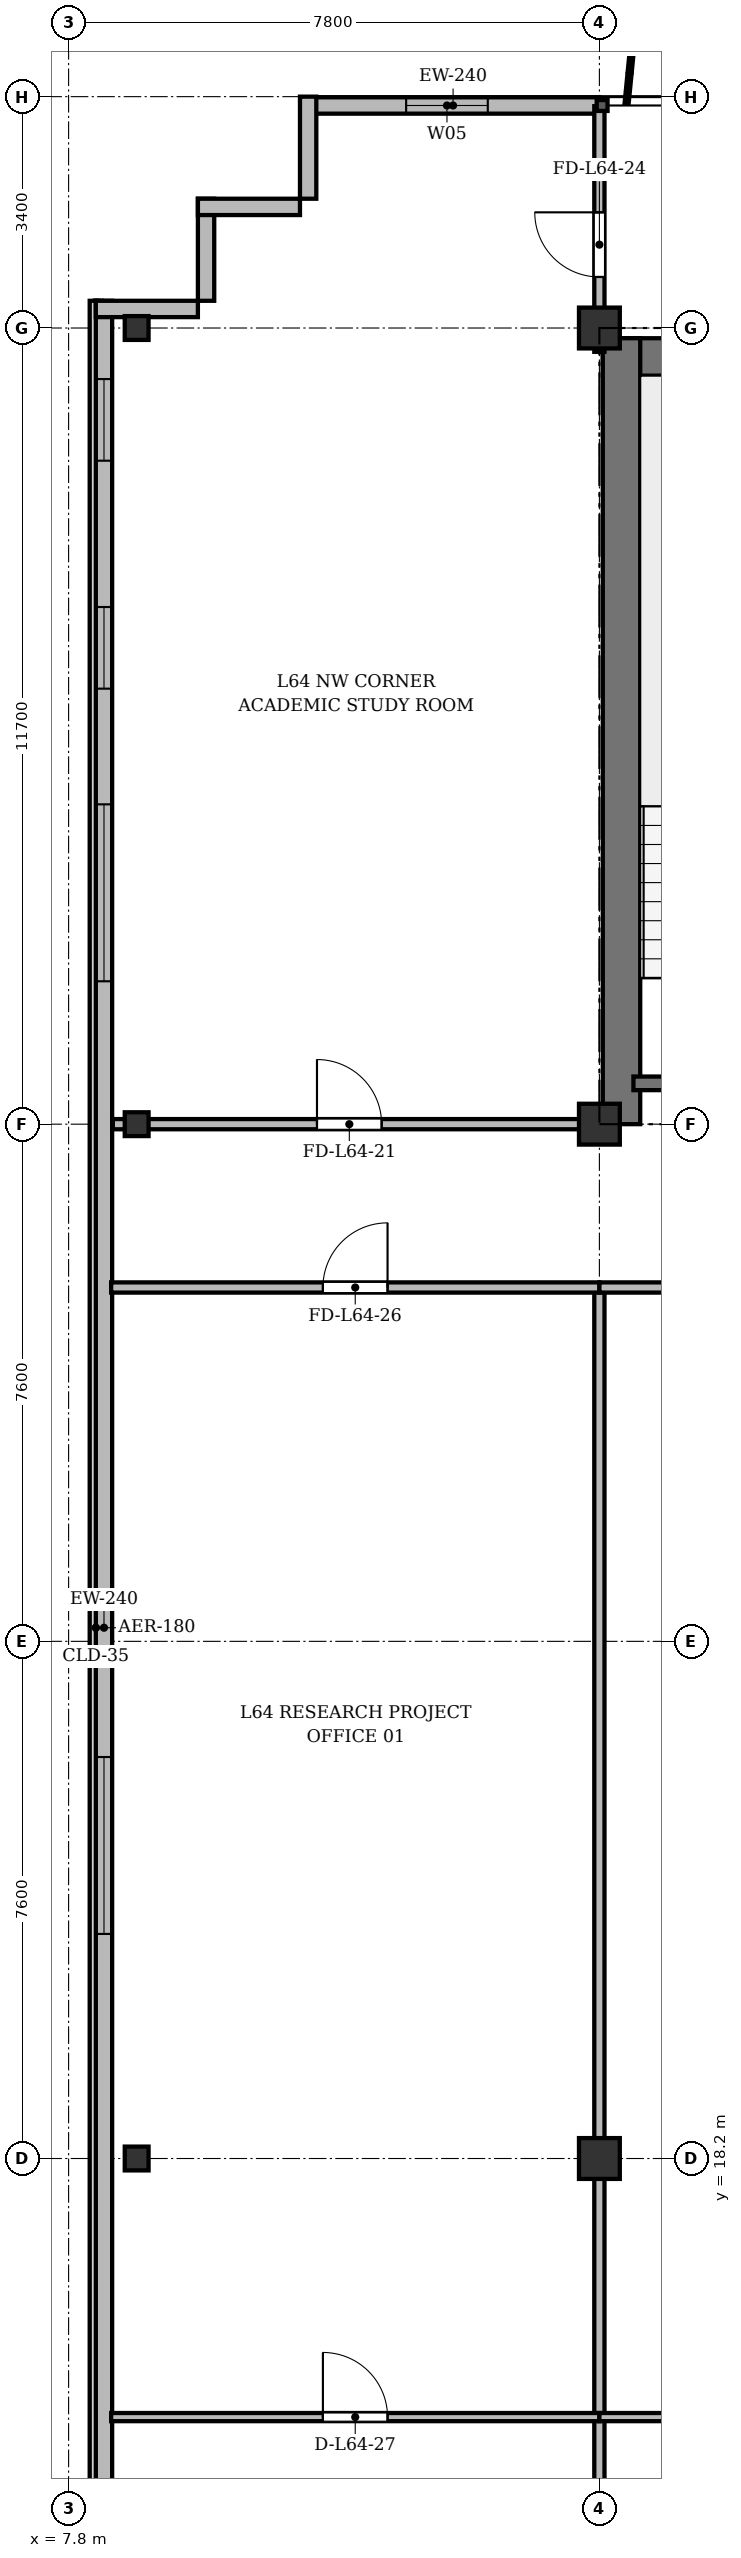
"""IFC4 building model, lengths in metres.
Left out: names, types, materials, properties, quantities, classifications, styles, units other than length and angle.
Written with IfcOpenShell. Run it as: python <this file> out.ifc"""

import sys

from ifc_helpers import new_model, si_unit, direction, frame, frame_2d, origin, origin_2d, place, context, subcontext, project, spatial, rectangle, i_section, extrude, source, transform, mapped, element, fill, save


model = new_model("IFC4")
c1 = context("Model", 3, precision=1e-05, world=origin(), true_north=direction((0.0, 1.0)))
c2 = subcontext(c1, "Body", "Model", "MODEL_VIEW")
j1 = project(units=[si_unit("LENGTHUNIT", "METRE"), si_unit("PLANEANGLEUNIT", "RADIAN")], contexts=[c1])
p1 = place(None, origin())
s1 = spatial("IfcSite", under=j1, at=p1, CompositionType="ELEMENT")
p2 = place(p1, origin())
s2 = spatial("IfcBuilding", under=s1, at=p2, CompositionType="ELEMENT")
p3 = place(p2, frame((0.0, 0.0, 248.7)))
s3 = spatial("IfcBuildingStorey", under=s2, at=p3, CompositionType="ELEMENT", Elevation=248.7)
m1 = source(origin(), c2, "Body", "SweptSolid", [
    extrude(i_section(OverallWidth=0.35, OverallDepth=0.35, WebThickness=0.018, FlangeThickness=0.028, at=origin_2d()), origin(), (0.0, 0.0, 1.0), 3.6),
])
for number, where, z_axis, x_axis in (
    (1, (8.8, 18.2, 0.0), (0.0, 0.0, 1.0), (1.0, 0.0, 0.0)),
    (2, (8.8, 33.4, 0.0), (0.0, 0.0, 1.0), (1.0, 0.0, 0.0)),
    (3, (8.8, 45.1, 0.0), (0.0, 0.0, 1.0), (1.0, 0.0, 0.0)),
):
    element("IfcColumn", number, at=place(p3, frame(where, z_axis=z_axis, x_axis=x_axis)), inside=s3, PredefinedType="COLUMN", context=c2, shape_type="MappedRepresentation", body=[
        mapped(m1, transform((0.0, 0.0, 0.0), x_axis=(1.0, 0.0, 0.0), y_axis=(0.0, 1.0, 0.0), z_axis=(0.0, 0.0, 1.0), scale=1.0)),
    ])
m2 = source(origin(), c2, "Body", "SweptSolid", [
    extrude(rectangle(XDim=0.6, YDim=0.6, at=origin_2d()), origin(), (0.0, 0.0, 1.0), 3.6),
])
for number, where, z_axis, x_axis in (
    (4, (15.6, 18.2, 0.0), (0.0, 0.0, 1.0), (1.0, 0.0, 0.0)),
    (5, (15.6, 33.4, 0.0), (0.0, 0.0, 1.0), (1.0, 0.0, 0.0)),
    (6, (15.6, 45.1, 0.0), (0.0, 0.0, 1.0), (1.0, 0.0, 0.0)),
):
    element("IfcColumn", number, at=place(p3, frame(where, z_axis=z_axis, x_axis=x_axis)), inside=s3, PredefinedType="COLUMN", context=c2, shape_type="MappedRepresentation", body=[
        mapped(m2, transform((0.0, 0.0, 0.0), x_axis=(1.0, 0.0, 0.0), y_axis=(0.0, 1.0, 0.0), z_axis=(0.0, 0.0, 1.0), scale=1.0)),
    ])
p4 = place(p3, frame((11.3, 48.37, 0.0), z_axis=(0.0, 0.0, 1.0), x_axis=(1.0, 0.0, 0.0)))
e7 = element("IfcWall", 7, at=p4, inside=s3, PredefinedType="SOLIDWALL", context=c2, shape_type="SweptSolid", body=[
    extrude(rectangle(XDim=4.3, YDim=0.24, at=frame_2d((2.15, 0.0))), origin(), (0.0, 0.0, 1.0), 3.37),
])
p5 = place(p4, frame((1.46, 0.0, 0.9)))
e8 = element("IfcOpeningElement", 8, at=p5, cuts=e7, PredefinedType="OPENING", context=c2, shape_type="SweptSolid", body=[
    extrude(rectangle(XDim=1.2, YDim=1.65, at=frame_2d((0.6, 0.825))), frame((0.0, 0.13, 0.0), z_axis=(0.0, -1.0, 0.0), x_axis=(1.0, 0.0, 0.0)), (0.0, 0.0, 1.0), 0.26),
])
p6 = place(p3, frame((8.32, 6.5, 0.0), z_axis=(0.0, 0.0, 1.0), x_axis=(0.0, 1.0, 0.0)))
e9 = element("IfcWall", 9, at=p6, inside=s3, PredefinedType="SOLIDWALL", context=c2, shape_type="SweptSolid", body=[
    extrude(rectangle(XDim=39.0, YDim=0.24, at=frame_2d((19.5, 0.0))), origin(), (0.0, 0.0, 1.0), 3.37),
])
p7 = place(p6, frame((1.45, 0.0, 0.92)))
e10 = element("IfcOpeningElement", 10, at=p7, cuts=e9, PredefinedType="OPENING", context=c2, shape_type="SweptSolid", body=[
    extrude(rectangle(XDim=1.2, YDim=1.65, at=frame_2d((0.6, 0.825))), frame((0.0, 0.13, 0.0), z_axis=(0.0, -1.0, 0.0), x_axis=(1.0, 0.0, 0.0)), (0.0, 0.0, 1.0), 0.26),
])
p8 = place(p6, frame((3.6, 0.0, 0.92)))
e11 = element("IfcOpeningElement", 11, at=p8, cuts=e9, PredefinedType="OPENING", context=c2, shape_type="SweptSolid", body=[
    extrude(rectangle(XDim=2.6, YDim=1.9, at=frame_2d((1.3, 0.95))), frame((0.0, 0.13, 0.0), z_axis=(0.0, -1.0, 0.0), x_axis=(1.0, 0.0, 0.0)), (0.0, 0.0, 1.0), 0.26),
])
p9 = place(p6, frame((15.0, 0.0, 0.92)))
e12 = element("IfcOpeningElement", 12, at=p9, cuts=e9, PredefinedType="OPENING", context=c2, shape_type="SweptSolid", body=[
    extrude(rectangle(XDim=2.6, YDim=1.9, at=frame_2d((1.3, 0.95))), frame((0.0, 0.13, 0.0), z_axis=(0.0, -1.0, 0.0), x_axis=(1.0, 0.0, 0.0)), (0.0, 0.0, 1.0), 0.26),
])
p10 = place(p6, frame((29.0, 0.0, 0.92)))
e13 = element("IfcOpeningElement", 13, at=p10, cuts=e9, PredefinedType="OPENING", context=c2, shape_type="SweptSolid", body=[
    extrude(rectangle(XDim=2.6, YDim=1.9, at=frame_2d((1.3, 0.95))), frame((0.0, 0.13, 0.0), z_axis=(0.0, -1.0, 0.0), x_axis=(1.0, 0.0, 0.0)), (0.0, 0.0, 1.0), 0.26),
])
p11 = place(p6, frame((33.3, 0.0, 0.92)))
e14 = element("IfcOpeningElement", 14, at=p11, cuts=e9, PredefinedType="OPENING", context=c2, shape_type="SweptSolid", body=[
    extrude(rectangle(XDim=1.2, YDim=1.65, at=frame_2d((0.6, 0.825))), frame((0.0, 0.13, 0.0), z_axis=(0.0, -1.0, 0.0), x_axis=(1.0, 0.0, 0.0)), (0.0, 0.0, 1.0), 0.26),
])
p12 = place(p6, frame((36.65, 0.0, 0.92)))
e15 = element("IfcOpeningElement", 15, at=p12, cuts=e9, PredefinedType="OPENING", context=c2, shape_type="SweptSolid", body=[
    extrude(rectangle(XDim=1.2, YDim=1.65, at=frame_2d((0.6, 0.825))), frame((0.0, 0.13, 0.0), z_axis=(0.0, -1.0, 0.0), x_axis=(1.0, 0.0, 0.0)), (0.0, 0.0, 1.0), 0.26),
])
for number, where, z_axis, x_axis in (
    (16, (8.2, 45.38, 0.0), (0.0, 0.0, 1.0), (1.0, 0.0, 0.0)),
    (17, (9.82, 45.5, 0.0), (0.0, 0.0, 1.0), (0.0, 1.0, 0.0)),
    (18, (9.7, 46.88, 0.0), (0.0, 0.0, 1.0), (1.0, 0.0, 0.0)),
    (19, (11.32, 47.0, 0.0), (0.0, 0.0, 1.0), (0.0, 1.0, 0.0)),
):
    element("IfcWall", number, at=place(p3, frame(where, z_axis=z_axis, x_axis=x_axis)), inside=s3, PredefinedType="SOLIDWALL", context=c2, shape_type="SweptSolid", body=[
        extrude(rectangle(XDim=1.5, YDim=0.24, at=frame_2d((0.75, 0.0))), origin(), (0.0, 0.0, 1.0), 3.37),
    ])
p13 = place(p3, frame((15.65, 44.675, 0.0), z_axis=(0.0, 0.0, 1.0), x_axis=(1.0, 0.0, 0.0)))
e20 = element("IfcWall", 20, at=p13, inside=s3, PredefinedType="SHEAR", context=c2, shape_type="SweptSolid", body=[
    extrude(rectangle(XDim=43.1, YDim=0.55, at=frame_2d((21.55, 0.0))), origin(), (0.0, 0.0, 1.0), 3.37),
])
p14 = place(p3, frame((15.925, 33.4, 0.0), z_axis=(0.0, 0.0, 1.0), x_axis=(0.0, 1.0, 0.0)))
e21 = element("IfcWall", 21, at=p14, inside=s3, PredefinedType="SHEAR", context=c2, shape_type="SweptSolid", body=[
    extrude(rectangle(XDim=11.55, YDim=0.55, at=frame_2d((5.775, 0.0))), origin(), (0.0, 0.0, 1.0), 3.37),
])
p15 = place(p3, frame((16.1, 34.0, 0.0), z_axis=(0.0, 0.0, 1.0), x_axis=(1.0, 0.0, 0.0)))
e22 = element("IfcWall", 22, at=p15, inside=s3, PredefinedType="SHEAR", context=c2, shape_type="SweptSolid", body=[
    extrude(rectangle(XDim=3.4, YDim=0.2, at=frame_2d((1.7, 0.0))), origin(), (0.0, 0.0, 1.0), 3.37),
])
p16 = place(p3, frame((8.45, 33.4, 0.0), z_axis=(0.0, 0.0, 1.0), x_axis=(1.0, 0.0, 0.0)))
e23 = element("IfcWall", 23, at=p16, inside=s3, PredefinedType="PARTITIONING", context=c2, shape_type="SweptSolid", body=[
    extrude(rectangle(XDim=7.15, YDim=0.15, at=frame_2d((3.575, 0.0))), origin(), (0.0, 0.0, 1.0), 2.92),
])
p17 = place(p16, frame((3.0, 0.0, 0.0)))
e24 = element("IfcOpeningElement", 24, at=p17, cuts=e23, PredefinedType="OPENING", context=c2, shape_type="SweptSolid", body=[
    extrude(rectangle(XDim=0.95, YDim=2.15, at=frame_2d((0.475, 1.075))), frame((0.0, 0.085, 0.0), z_axis=(0.0, -1.0, 0.0), x_axis=(1.0, 0.0, 0.0)), (0.0, 0.0, 1.0), 0.17),
])
p18 = place(p3, frame((15.6, 44.75, 0.0), z_axis=(0.0, 0.0, 1.0), x_axis=(0.0, 1.0, 0.0)))
e25 = element("IfcWall", 25, at=p18, inside=s3, PredefinedType="PARTITIONING", context=c2, shape_type="SweptSolid", body=[
    extrude(rectangle(XDim=3.61, YDim=0.15, at=frame_2d((1.805, 0.0))), origin(), (0.0, 0.0, 1.0), 2.87),
])
p19 = place(p18, frame((1.1, 0.0, 0.0)))
e26 = element("IfcOpeningElement", 26, at=p19, cuts=e25, PredefinedType="OPENING", context=c2, shape_type="SweptSolid", body=[
    extrude(rectangle(XDim=0.95, YDim=2.15, at=frame_2d((0.475, 1.075))), frame((0.0, 0.085, 0.0), z_axis=(0.0, -1.0, 0.0), x_axis=(1.0, 0.0, 0.0)), (0.0, 0.0, 1.0), 0.17),
])
p20 = place(p3, frame((15.6, 3.725, 0.0), z_axis=(0.0, 0.0, 1.0), x_axis=(0.0, 1.0, 0.0)))
e27 = element("IfcWall", 27, at=p20, inside=s3, PredefinedType="PARTITIONING", context=c2, shape_type="SweptSolid", body=[
    extrude(rectangle(XDim=27.275, YDim=0.15, at=frame_2d((13.637, 0.0))), origin(), (0.0, 0.0, 1.0), 2.87),
])
p21 = place(p3, frame((8.425, 31.0, 0.0), z_axis=(0.0, 0.0, 1.0), x_axis=(1.0, 0.0, 0.0)))
e28 = element("IfcWall", 28, at=p21, inside=s3, PredefinedType="PARTITIONING", context=c2, shape_type="SweptSolid", body=[
    extrude(rectangle(XDim=7.175, YDim=0.15, at=frame_2d((3.587, 0.0))), origin(), (0.0, 0.0, 1.0), 2.87),
])
p22 = place(p21, frame((3.112, 0.0, 0.0)))
e29 = element("IfcOpeningElement", 29, at=p22, cuts=e28, PredefinedType="OPENING", context=c2, shape_type="SweptSolid", body=[
    extrude(rectangle(XDim=0.95, YDim=2.15, at=frame_2d((0.475, 1.075))), frame((0.0, 0.085, 0.0), z_axis=(0.0, -1.0, 0.0), x_axis=(1.0, 0.0, 0.0)), (0.0, 0.0, 1.0), 0.17),
])
p23 = place(p3, frame((8.425, 14.4, 0.0), z_axis=(0.0, 0.0, 1.0), x_axis=(1.0, 0.0, 0.0)))
e30 = element("IfcWall", 30, at=p23, inside=s3, PredefinedType="PARTITIONING", context=c2, shape_type="SweptSolid", body=[
    extrude(rectangle(XDim=7.175, YDim=0.12, at=frame_2d((3.587, 0.0))), origin(), (0.0, 0.0, 1.0), 2.87),
])
p24 = place(p23, frame((3.112, 0.0, 0.0)))
e31 = element("IfcOpeningElement", 31, at=p24, cuts=e30, PredefinedType="OPENING", context=c2, shape_type="SweptSolid", body=[
    extrude(rectangle(XDim=0.95, YDim=2.15, at=frame_2d((0.475, 1.075))), frame((0.0, 0.07, 0.0), z_axis=(0.0, -1.0, 0.0), x_axis=(1.0, 0.0, 0.0)), (0.0, 0.0, 1.0), 0.14),
])
p25 = place(p3, frame((15.6, 31.0, 0.0), z_axis=(0.0, 0.0, 1.0), x_axis=(1.0, 0.0, 0.0)))
e32 = element("IfcWall", 32, at=p25, inside=s3, PredefinedType="PARTITIONING", context=c2, shape_type="SweptSolid", body=[
    extrude(rectangle(XDim=7.8, YDim=0.15, at=frame_2d((3.9, 0.0))), origin(), (0.0, 0.0, 1.0), 2.87),
])
p26 = place(p25, frame((3.333, 0.0, 0.0)))
e33 = element("IfcOpeningElement", 33, at=p26, cuts=e32, PredefinedType="OPENING", context=c2, shape_type="SweptSolid", body=[
    extrude(rectangle(XDim=0.95, YDim=2.15, at=frame_2d((0.475, 1.075))), frame((0.0, 0.085, 0.0), z_axis=(0.0, -1.0, 0.0), x_axis=(1.0, 0.0, 0.0)), (0.0, 0.0, 1.0), 0.17),
])
p27 = place(p3, frame((15.6, 14.4, 0.0), z_axis=(0.0, 0.0, 1.0), x_axis=(1.0, 0.0, 0.0)))
e34 = element("IfcWall", 34, at=p27, inside=s3, PredefinedType="PARTITIONING", context=c2, shape_type="SweptSolid", body=[
    extrude(rectangle(XDim=7.8, YDim=0.12, at=frame_2d((3.9, 0.0))), origin(), (0.0, 0.0, 1.0), 2.87),
])
p28 = place(p27, frame((3.333, 0.0, 0.0)))
e35 = element("IfcOpeningElement", 35, at=p28, cuts=e34, PredefinedType="OPENING", context=c2, shape_type="SweptSolid", body=[
    extrude(rectangle(XDim=0.95, YDim=2.15, at=frame_2d((0.475, 1.075))), frame((0.0, 0.07, 0.0), z_axis=(0.0, -1.0, 0.0), x_axis=(1.0, 0.0, 0.0)), (0.0, 0.0, 1.0), 0.14),
])
m3 = source(origin(), c2, "Body", "SweptSolid", [
    extrude(rectangle(XDim=1.2, YDim=1.65, at=frame_2d((0.6, 0.825))), frame((0.0, 0.03, 0.0), z_axis=(0.0, -1.0, 0.0), x_axis=(1.0, 0.0, 0.0)), (0.0, 0.0, 1.0), 0.06),
])
p29 = place(p5, origin())
e36 = element("IfcWindow", 36, at=p29, inside=s3, PartitioningType="SINGLE_PANEL", PredefinedType="WINDOW", context=c2, shape_type="MappedRepresentation", body=[
    mapped(m3, transform((0.0, 0.0, 0.0), x_axis=(1.0, 0.0, 0.0), y_axis=(0.0, 1.0, 0.0), z_axis=(0.0, 0.0, 1.0), scale=1.0)),
])
fill(e8, e36)
m4 = source(origin(), c2, "Body", "SweptSolid", [
    extrude(rectangle(XDim=2.6, YDim=1.9, at=frame_2d((1.3, 0.95))), frame((0.0, 0.03, 0.0), z_axis=(0.0, -1.0, 0.0), x_axis=(1.0, 0.0, 0.0)), (0.0, 0.0, 1.0), 0.06),
])
p30 = place(p9, origin())
e37 = element("IfcWindow", 37, at=p30, inside=s3, PartitioningType="SINGLE_PANEL", PredefinedType="WINDOW", context=c2, shape_type="MappedRepresentation", body=[
    mapped(m4, transform((0.0, 0.0, 0.0), x_axis=(1.0, 0.0, 0.0), y_axis=(0.0, 1.0, 0.0), z_axis=(0.0, 0.0, 1.0), scale=1.0)),
])
fill(e12, e37)
p31 = place(p10, origin())
e38 = element("IfcWindow", 38, at=p31, inside=s3, PartitioningType="SINGLE_PANEL", PredefinedType="WINDOW", context=c2, shape_type="MappedRepresentation", body=[
    mapped(m4, transform((0.0, 0.0, 0.0), x_axis=(1.0, 0.0, 0.0), y_axis=(0.0, 1.0, 0.0), z_axis=(0.0, 0.0, 1.0), scale=1.0)),
])
fill(e13, e38)
p32 = place(p11, origin())
e39 = element("IfcWindow", 39, at=p32, inside=s3, PartitioningType="SINGLE_PANEL", PredefinedType="WINDOW", context=c2, shape_type="MappedRepresentation", body=[
    mapped(m3, transform((0.0, 0.0, 0.0), x_axis=(1.0, 0.0, 0.0), y_axis=(0.0, 1.0, 0.0), z_axis=(0.0, 0.0, 1.0), scale=1.0)),
])
fill(e14, e39)
p33 = place(p12, origin())
e40 = element("IfcWindow", 40, at=p33, inside=s3, PartitioningType="SINGLE_PANEL", PredefinedType="WINDOW", context=c2, shape_type="MappedRepresentation", body=[
    mapped(m3, transform((0.0, 0.0, 0.0), x_axis=(1.0, 0.0, 0.0), y_axis=(0.0, 1.0, 0.0), z_axis=(0.0, 0.0, 1.0), scale=1.0)),
])
fill(e15, e40)
m5 = source(origin(), c2, "Body", "SweptSolid", [
    extrude(rectangle(XDim=0.95, YDim=2.15, at=frame_2d((0.475, 1.075))), frame((0.0, 0.025, 0.0), z_axis=(0.0, -1.0, 0.0), x_axis=(1.0, 0.0, 0.0)), (0.0, 0.0, 1.0), 0.05),
])
p34 = place(p17, origin())
e41 = element("IfcDoor", 41, at=p34, inside=s3, OperationType="SINGLE_SWING_LEFT", PredefinedType="DOOR", context=c2, shape_type="MappedRepresentation", body=[
    mapped(m5, transform((0.0, 0.0, 0.0), x_axis=(1.0, 0.0, 0.0), y_axis=(0.0, 1.0, 0.0), z_axis=(0.0, 0.0, 1.0), scale=1.0)),
])
fill(e24, e41)
p35 = place(p19, origin())
e42 = element("IfcDoor", 42, at=p35, inside=s3, OperationType="SINGLE_SWING_RIGHT", PredefinedType="DOOR", context=c2, shape_type="MappedRepresentation", body=[
    mapped(m5, transform((0.0, 0.0, 0.0), x_axis=(1.0, 0.0, 0.0), y_axis=(0.0, 1.0, 0.0), z_axis=(0.0, 0.0, 1.0), scale=1.0)),
])
fill(e26, e42)
p36 = place(p22, origin())
e43 = element("IfcDoor", 43, at=p36, inside=s3, OperationType="SINGLE_SWING_RIGHT", PredefinedType="DOOR", context=c2, shape_type="MappedRepresentation", body=[
    mapped(m5, transform((0.0, 0.0, 0.0), x_axis=(1.0, 0.0, 0.0), y_axis=(0.0, 1.0, 0.0), z_axis=(0.0, 0.0, 1.0), scale=1.0)),
])
fill(e29, e43)
p37 = place(p24, origin())
e44 = element("IfcDoor", 44, at=p37, inside=s3, OperationType="SINGLE_SWING_LEFT", PredefinedType="DOOR", context=c2, shape_type="MappedRepresentation", body=[
    mapped(m5, transform((0.0, 0.0, 0.0), x_axis=(1.0, 0.0, 0.0), y_axis=(0.0, 1.0, 0.0), z_axis=(0.0, 0.0, 1.0), scale=1.0)),
])
fill(e31, e44)
save(model, sys.argv[1])
